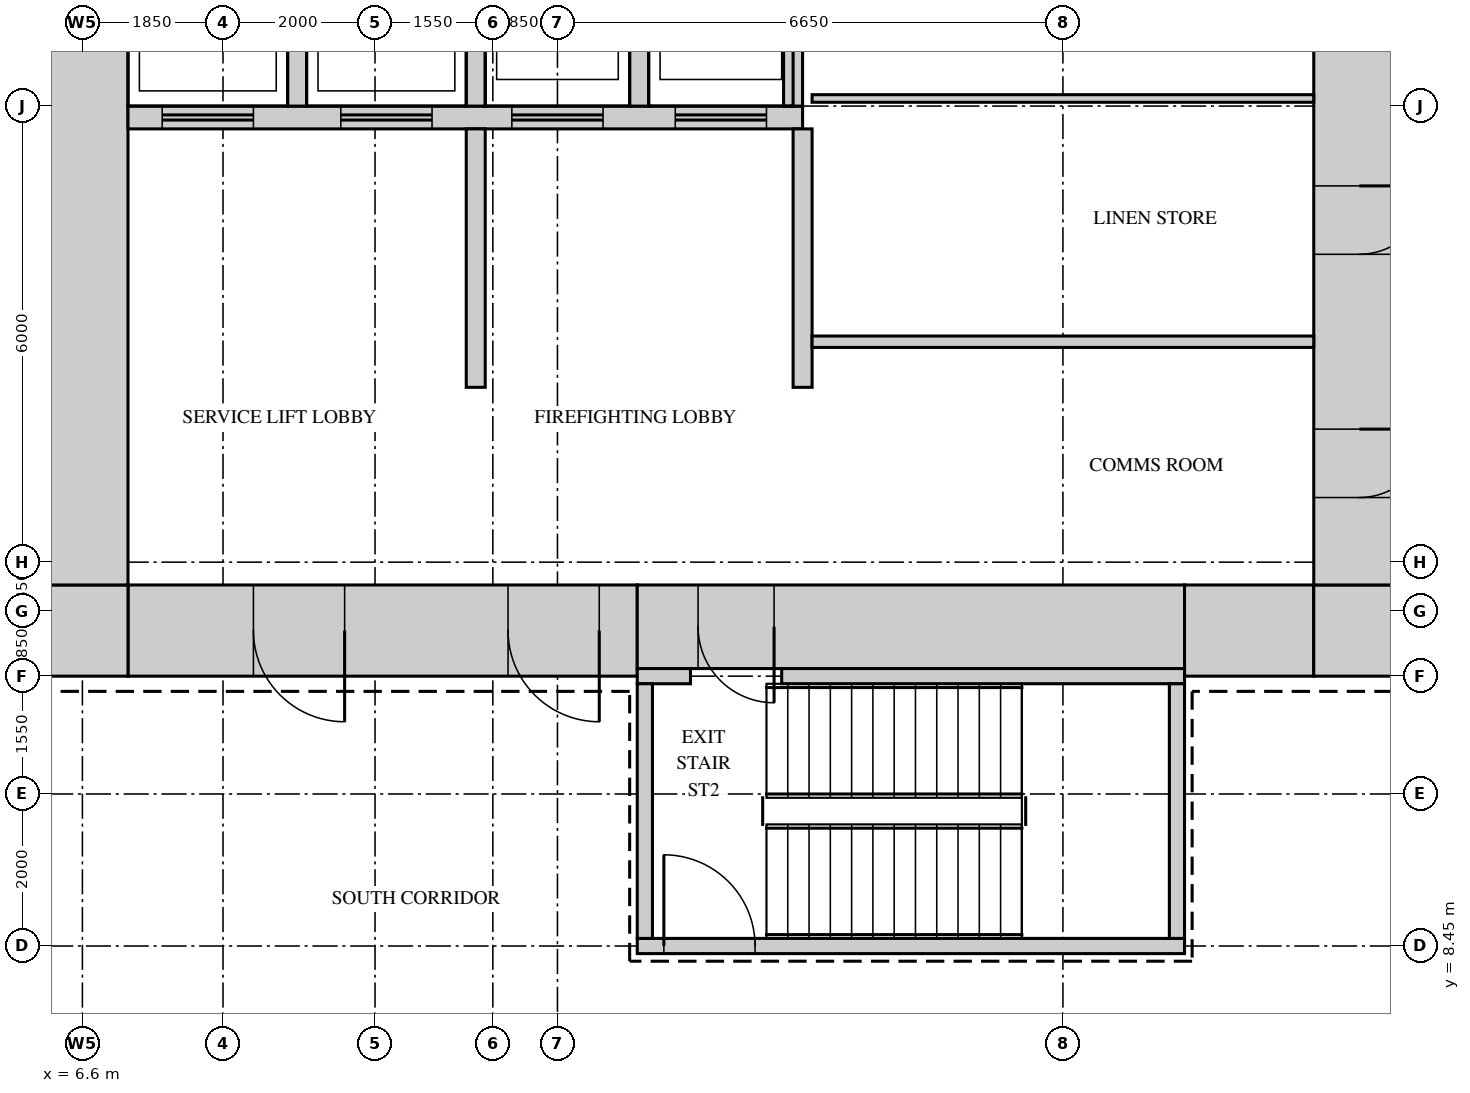
"""IFC4 building model, lengths in metres.
Left out: names, types, materials, properties, quantities, classifications, styles, units other than length and angle.
Written with IfcOpenShell. Run it as: python <this file> out.ifc"""

import sys

from ifc_helpers import new_model, si_unit, direction, frame, frame_2d, origin, place, context, subcontext, project, spatial, rectangle, extrude, source, transform, mapped, element, fill, save


model = new_model("IFC4")
c1 = context("Model", 3, precision=1e-05, world=origin(), true_north=direction((0.0, 1.0)))
c2 = subcontext(c1, "Body", "Model", "MODEL_VIEW")
j1 = project(units=[si_unit("LENGTHUNIT", "METRE"), si_unit("PLANEANGLEUNIT", "RADIAN")], contexts=[c1])
p1 = place(None, origin())
s1 = spatial("IfcSite", under=j1, at=p1, CompositionType="ELEMENT")
p2 = place(p1, origin())
s2 = spatial("IfcBuilding", under=s1, at=p2, CompositionType="ELEMENT")
p3 = place(p2, frame((0.0, 0.0, 55.5)))
s3 = spatial("IfcBuildingStorey", under=s2, at=p3, CompositionType="ELEMENT", Elevation=55.5)
m1 = source(origin(), c2, "Body", "SweptSolid", [
    extrude(rectangle(XDim=6.7, YDim=1.2, at=frame_2d((3.35, 0.0))), origin(), (0.0, 0.0, 1.0), 4.2),
])
p4 = place(p3, frame((7.2, 12.6, 0.0), z_axis=(0.0, 0.0, 1.0), x_axis=(1.0, 0.0, 0.0)))
e1 = element("IfcWall", 1, at=p4, inside=s3, PredefinedType="SHEAR", context=c2, shape_type="MappedRepresentation", body=[
    mapped(m1, transform((0.0, 0.0, 0.0))),
])
m2 = source(origin(), c2, "Body", "SweptSolid", [
    extrude(rectangle(XDim=1.2, YDim=2.1, at=frame_2d((0.6, 1.05))), frame((0.0, 0.61, 0.0), z_axis=(0.0, -1.0, 0.0), x_axis=(1.0, 0.0, 0.0)), (0.0, 0.0, 1.0), 1.22),
])
p5 = place(p4, frame((5.0, 0.0, 0.0)))
e2 = element("IfcOpeningElement", 2, at=p5, cuts=e1, PredefinedType="OPENING", context=c2, shape_type="MappedRepresentation", body=[
    mapped(m2, transform((0.0, 0.0, 0.0))),
])
p6 = place(p4, frame((1.65, 0.0, 0.0)))
e3 = element("IfcOpeningElement", 3, at=p6, cuts=e1, PredefinedType="OPENING", context=c2, shape_type="MappedRepresentation", body=[
    mapped(m2, transform((0.0, 0.0, 0.0))),
])
m3 = source(origin(), c2, "Body", "SweptSolid", [
    extrude(rectangle(XDim=7.2, YDim=1.1, at=frame_2d((3.6, 0.0))), origin(), (0.0, 0.0, 1.0), 4.2),
])
p7 = place(p3, frame((13.9, 12.65, 0.0), z_axis=(0.0, 0.0, 1.0), x_axis=(1.0, 0.0, 0.0)))
e4 = element("IfcWall", 4, at=p7, inside=s3, PredefinedType="SHEAR", context=c2, shape_type="MappedRepresentation", body=[
    mapped(m3, transform((0.0, 0.0, 0.0))),
])
m4 = source(origin(), c2, "Body", "SweptSolid", [
    extrude(rectangle(XDim=1.0, YDim=2.1, at=frame_2d((0.5, 1.05))), frame((0.0, 0.56, 0.0), z_axis=(0.0, -1.0, 0.0), x_axis=(1.0, 0.0, 0.0)), (0.0, 0.0, 1.0), 1.12),
])
p8 = place(p7, frame((0.8, 0.0, 0.0)))
e5 = element("IfcOpeningElement", 5, at=p8, cuts=e4, PredefinedType="OPENING", context=c2, shape_type="MappedRepresentation", body=[
    mapped(m4, transform((0.0, 0.0, 0.0))),
])
m5 = source(origin(), c2, "Body", "SweptSolid", [
    extrude(rectangle(XDim=1.7, YDim=1.2, at=frame_2d((0.85, 0.0))), origin(), (0.0, 0.0, 1.0), 4.2),
])
p9 = place(p3, frame((21.1, 12.6, 0.0), z_axis=(0.0, 0.0, 1.0), x_axis=(1.0, 0.0, 0.0)))
e6 = element("IfcWall", 6, at=p9, inside=s3, PredefinedType="SHEAR", context=c2, shape_type="MappedRepresentation", body=[
    mapped(m5, transform((0.0, 0.0, 0.0))),
])
m6 = source(origin(), c2, "Body", "SweptSolid", [
    extrude(rectangle(XDim=1.2, YDim=1.2, at=frame_2d((0.6, 0.0))), origin(), (0.0, 0.0, 1.0), 4.2),
])
for number, where, z_axis, x_axis in (
    (7, (22.8, 12.6, 0.0), (0.0, 0.0, 1.0), (1.0, 0.0, 0.0)),
    (8, (6.0, 12.6, 0.0), (0.0, 0.0, 1.0), (1.0, 0.0, 0.0)),
):
    element("IfcWall", number, at=place(p3, frame(where, z_axis=z_axis, x_axis=x_axis)), inside=s3, PredefinedType="SHEAR", context=c2, shape_type="MappedRepresentation", body=[
        mapped(m6, transform((0.0, 0.0, 0.0))),
    ])
m7 = source(origin(), c2, "Body", "SweptSolid", [
    extrude(rectangle(XDim=27.6, YDim=1.2, at=frame_2d((13.8, 0.0))), origin(), (0.0, 0.0, 1.0), 4.2),
])
p10 = place(p3, frame((23.4, 13.2, 0.0), z_axis=(0.0, 0.0, 1.0), x_axis=(0.0, 1.0, 0.0)))
e9 = element("IfcWall", 9, at=p10, inside=s3, PredefinedType="SHEAR", context=c2, shape_type="MappedRepresentation", body=[
    mapped(m7, transform((0.0, 0.0, 0.0))),
])
m8 = source(origin(), c2, "Body", "SweptSolid", [
    extrude(rectangle(XDim=1.8, YDim=2.1, at=frame_2d((0.9, 1.05))), frame((0.0, 0.61, 0.0), z_axis=(0.0, -1.0, 0.0), x_axis=(1.0, 0.0, 0.0)), (0.0, 0.0, 1.0), 1.22),
])
p11 = place(p10, frame((22.4, 0.0, 0.0)))
e10 = element("IfcOpeningElement", 10, at=p11, cuts=e9, PredefinedType="OPENING", context=c2, shape_type="MappedRepresentation", body=[
    mapped(m8, transform((0.0, 0.0, 0.0))),
])
p12 = place(p10, frame((15.15, 0.0, 0.0)))
e11 = element("IfcOpeningElement", 11, at=p12, cuts=e9, PredefinedType="OPENING", context=c2, shape_type="MappedRepresentation", body=[
    mapped(m2, transform((0.0, 0.0, 0.0))),
])
m9 = source(origin(), c2, "Body", "SweptSolid", [
    extrude(rectangle(XDim=0.9, YDim=2.1, at=frame_2d((0.45, 1.05))), frame((0.0, 0.61, 0.0), z_axis=(0.0, -1.0, 0.0), x_axis=(1.0, 0.0, 0.0)), (0.0, 0.0, 1.0), 1.22),
])
p13 = place(p10, frame((1.15, 0.0, 0.0)))
e12 = element("IfcOpeningElement", 12, at=p13, cuts=e9, PredefinedType="OPENING", context=c2, shape_type="MappedRepresentation", body=[
    mapped(m9, transform((0.0, 0.0, 0.0))),
])
p14 = place(p10, frame((4.35, 0.0, 0.0)))
e13 = element("IfcOpeningElement", 13, at=p14, cuts=e9, PredefinedType="OPENING", context=c2, shape_type="MappedRepresentation", body=[
    mapped(m9, transform((0.0, 0.0, 0.0))),
])
p15 = place(p10, frame((7.6, 0.0, 0.0)))
e14 = element("IfcOpeningElement", 14, at=p15, cuts=e9, PredefinedType="OPENING", context=c2, shape_type="MappedRepresentation", body=[
    mapped(m9, transform((0.0, 0.0, 0.0))),
])
p16 = place(p3, frame((6.6, 13.2, 0.0), z_axis=(0.0, 0.0, 1.0), x_axis=(0.0, 1.0, 0.0)))
e15 = element("IfcWall", 15, at=p16, inside=s3, PredefinedType="SHEAR", context=c2, shape_type="MappedRepresentation", body=[
    mapped(m7, transform((0.0, 0.0, 0.0))),
])
m10 = source(origin(), c2, "Body", "SweptSolid", [
    extrude(rectangle(XDim=0.7, YDim=0.2, at=frame_2d((0.35, 0.0))), origin(), (0.0, 0.0, 1.0), 4.2),
])
p17 = place(p3, frame((13.9, 12.0, 0.0), z_axis=(0.0, 0.0, 1.0), x_axis=(1.0, 0.0, 0.0)))
e16 = element("IfcWall", 16, at=p17, inside=s3, PredefinedType="SHEAR", context=c2, shape_type="MappedRepresentation", body=[
    mapped(m10, transform((0.0, 0.0, 0.0))),
])
m11 = source(origin(), c2, "Body", "SweptSolid", [
    extrude(rectangle(XDim=5.3, YDim=0.2, at=frame_2d((2.65, 0.0))), origin(), (0.0, 0.0, 1.0), 4.2),
])
p18 = place(p3, frame((15.8, 12.0, 0.0), z_axis=(0.0, 0.0, 1.0), x_axis=(1.0, 0.0, 0.0)))
e17 = element("IfcWall", 17, at=p18, inside=s3, PredefinedType="SHEAR", context=c2, shape_type="MappedRepresentation", body=[
    mapped(m11, transform((0.0, 0.0, 0.0))),
])
m12 = source(origin(), c2, "Body", "SweptSolid", [
    extrude(rectangle(XDim=7.2, YDim=0.2, at=frame_2d((3.6, 0.0))), origin(), (0.0, 0.0, 1.0), 4.2),
])
p19 = place(p3, frame((13.9, 8.45, 0.0), z_axis=(0.0, 0.0, 1.0), x_axis=(1.0, 0.0, 0.0)))
e18 = element("IfcWall", 18, at=p19, inside=s3, PredefinedType="SHEAR", context=c2, shape_type="MappedRepresentation", body=[
    mapped(m12, transform((0.0, 0.0, 0.0))),
])
m13 = source(origin(), c2, "Body", "SweptSolid", [
    extrude(rectangle(XDim=1.2, YDim=2.1, at=frame_2d((0.6, 1.05))), frame((0.0, 0.11, 0.0), z_axis=(0.0, -1.0, 0.0), x_axis=(1.0, 0.0, 0.0)), (0.0, 0.0, 1.0), 0.22),
])
p20 = place(p19, frame((0.35, 0.0, 0.0)))
e19 = element("IfcOpeningElement", 19, at=p20, cuts=e18, PredefinedType="OPENING", context=c2, shape_type="MappedRepresentation", body=[
    mapped(m13, transform((0.0, 0.0, 0.0))),
])
m14 = source(origin(), c2, "Body", "SweptSolid", [
    extrude(rectangle(XDim=3.35, YDim=0.2, at=frame_2d((1.675, 0.0))), origin(), (0.0, 0.0, 1.0), 4.2),
])
for number, where, z_axis, x_axis in (
    (20, (21.0, 8.55, 0.0), (0.0, 0.0, 1.0), (0.0, 1.0, 0.0)),
    (21, (14.0, 8.55, 0.0), (0.0, 0.0, 1.0), (0.0, 1.0, 0.0)),
):
    element("IfcWall", number, at=place(p3, frame(where, z_axis=z_axis, x_axis=x_axis)), inside=s3, PredefinedType="SHEAR", context=c2, shape_type="MappedRepresentation", body=[
        mapped(m14, transform((0.0, 0.0, 0.0))),
    ])
m15 = source(origin(), c2, "Body", "SweptSolid", [
    extrude(rectangle(XDim=8.875, YDim=0.3, at=frame_2d((4.438, 0.0))), origin(), (0.0, 0.0, 1.0), 4.2),
])
p21 = place(p3, frame((7.2, 19.35, 0.0), z_axis=(0.0, 0.0, 1.0), x_axis=(1.0, 0.0, 0.0)))
e22 = element("IfcWall", 22, at=p21, inside=s3, PredefinedType="STANDARD", context=c2, shape_type="MappedRepresentation", body=[
    mapped(m15, transform((0.0, 0.0, 0.0))),
])
m16 = source(origin(), c2, "Body", "SweptSolid", [
    extrude(rectangle(XDim=1.2, YDim=2.1, at=frame_2d((0.6, 1.05))), frame((0.0, 0.16, 0.0), z_axis=(0.0, -1.0, 0.0), x_axis=(1.0, 0.0, 0.0)), (0.0, 0.0, 1.0), 0.32),
])
p22 = place(p21, frame((0.45, 0.0, 0.0)))
e23 = element("IfcOpeningElement", 23, at=p22, cuts=e22, PredefinedType="OPENING", context=c2, shape_type="MappedRepresentation", body=[
    mapped(m16, transform((0.0, 0.0, 0.0))),
])
p23 = place(p21, frame((2.8, 0.0, 0.0)))
e24 = element("IfcOpeningElement", 24, at=p23, cuts=e22, PredefinedType="OPENING", context=c2, shape_type="MappedRepresentation", body=[
    mapped(m16, transform((0.0, 0.0, 0.0))),
])
p24 = place(p21, frame((5.05, 0.0, 0.0)))
e25 = element("IfcOpeningElement", 25, at=p24, cuts=e22, PredefinedType="OPENING", context=c2, shape_type="MappedRepresentation", body=[
    mapped(m16, transform((0.0, 0.0, 0.0))),
])
p25 = place(p21, frame((7.2, 0.0, 0.0)))
e26 = element("IfcOpeningElement", 26, at=p25, cuts=e22, PredefinedType="OPENING", context=c2, shape_type="MappedRepresentation", body=[
    mapped(m16, transform((0.0, 0.0, 0.0))),
])
m17 = source(origin(), c2, "Body", "SweptSolid", [
    extrude(rectangle(XDim=3.1, YDim=0.25, at=frame_2d((1.55, 0.0))), origin(), (0.0, 0.0, 1.0), 4.2),
])
for number, where, z_axis, x_axis in (
    (27, (9.425, 19.5, 0.0), (0.0, 0.0, 1.0), (0.0, 1.0, 0.0)),
    (28, (11.775, 19.5, 0.0), (0.0, 0.0, 1.0), (0.0, 1.0, 0.0)),
    (29, (13.925, 19.5, 0.0), (0.0, 0.0, 1.0), (0.0, 1.0, 0.0)),
    (30, (15.95, 19.5, 0.0), (0.0, 0.0, 1.0), (0.0, 1.0, 0.0)),
):
    element("IfcWall", number, at=place(p3, frame(where, z_axis=z_axis, x_axis=x_axis)), inside=s3, PredefinedType="STANDARD", context=c2, shape_type="MappedRepresentation", body=[
        mapped(m17, transform((0.0, 0.0, 0.0))),
    ])
m18 = source(origin(), c2, "Body", "SweptSolid", [
    extrude(rectangle(XDim=3.4, YDim=0.25, at=frame_2d((1.7, 0.0))), origin(), (0.0, 0.0, 1.0), 4.2),
])
for number, where, z_axis, x_axis in (
    (31, (16.075, 15.8, 0.0), (0.0, 0.0, 1.0), (0.0, 1.0, 0.0)),
    (32, (11.775, 15.8, 0.0), (0.0, 0.0, 1.0), (0.0, 1.0, 0.0)),
):
    element("IfcWall", number, at=place(p3, frame(where, z_axis=z_axis, x_axis=x_axis)), inside=s3, PredefinedType="STANDARD", context=c2, shape_type="MappedRepresentation", body=[
        mapped(m18, transform((0.0, 0.0, 0.0))),
    ])
m19 = source(origin(), c2, "Body", "SweptSolid", [
    extrude(rectangle(XDim=6.6, YDim=0.15, at=frame_2d((3.3, 0.0))), origin(), (0.0, 0.0, 1.0), 4.3),
])
p26 = place(p3, frame((16.2, 16.4, 0.0), z_axis=(0.0, 0.0, 1.0), x_axis=(1.0, 0.0, 0.0)))
e33 = element("IfcWall", 33, at=p26, inside=s3, PredefinedType="PARTITIONING", context=c2, shape_type="MappedRepresentation", body=[
    mapped(m19, transform((0.0, 0.0, 0.0))),
])
m20 = source(origin(), c2, "Body", "SweptSolid", [
    extrude(rectangle(XDim=6.6, YDim=0.1, at=frame_2d((3.3, 0.0))), origin(), (0.0, 0.0, 1.0), 4.3),
])
p27 = place(p3, frame((16.2, 19.6, 0.0), z_axis=(0.0, 0.0, 1.0), x_axis=(1.0, 0.0, 0.0)))
e34 = element("IfcWall", 34, at=p27, inside=s3, PredefinedType="PARTITIONING", context=c2, shape_type="MappedRepresentation", body=[
    mapped(m20, transform((0.0, 0.0, 0.0))),
])
m21 = source(origin(), c2, "Body", "SweptSolid", [
    extrude(rectangle(XDim=0.9, YDim=2.1, at=frame_2d((0.45, 1.05))), frame((0.0, 0.55, 0.0), z_axis=(0.0, -1.0, 0.0), x_axis=(1.0, 0.0, 0.0)), (0.0, 0.0, 1.0), 1.1),
])
p28 = place(p13, origin())
e35 = element("IfcDoor", 35, at=p28, inside=s3, OperationType="SINGLE_SWING_RIGHT", PredefinedType="DOOR", context=c2, shape_type="MappedRepresentation", body=[
    mapped(m21, transform((0.0, 0.0, 0.0))),
])
fill(e12, e35)
p29 = place(p14, origin())
e36 = element("IfcDoor", 36, at=p29, inside=s3, OperationType="SINGLE_SWING_RIGHT", PredefinedType="DOOR", context=c2, shape_type="MappedRepresentation", body=[
    mapped(m21, transform((0.0, 0.0, 0.0))),
])
fill(e13, e36)
m22 = source(origin(), c2, "Body", "SweptSolid", [
    extrude(rectangle(XDim=1.2, YDim=2.1, at=frame_2d((0.6, 1.05))), frame((0.0, 0.55, 0.0), z_axis=(0.0, -1.0, 0.0), x_axis=(1.0, 0.0, 0.0)), (0.0, 0.0, 1.0), 1.1),
])
p30 = place(p5, origin())
e37 = element("IfcDoor", 37, at=p30, inside=s3, OperationType="SINGLE_SWING_RIGHT", PredefinedType="DOOR", context=c2, shape_type="MappedRepresentation", body=[
    mapped(m22, transform((0.0, 0.0, 0.0))),
])
fill(e2, e37)
p31 = place(p6, origin())
e38 = element("IfcDoor", 38, at=p31, inside=s3, OperationType="SINGLE_SWING_RIGHT", PredefinedType="DOOR", context=c2, shape_type="MappedRepresentation", body=[
    mapped(m22, transform((0.0, 0.0, 0.0))),
])
fill(e3, e38)
m23 = source(origin(), c2, "Body", "SweptSolid", [
    extrude(rectangle(XDim=1.0, YDim=2.1, at=frame_2d((0.5, 1.05))), frame((0.0, 0.5, 0.0), z_axis=(0.0, -1.0, 0.0), x_axis=(1.0, 0.0, 0.0)), (0.0, 0.0, 1.0), 1.0),
])
p32 = place(p8, origin())
e39 = element("IfcDoor", 39, at=p32, inside=s3, OperationType="SINGLE_SWING_RIGHT", PredefinedType="DOOR", context=c2, shape_type="MappedRepresentation", body=[
    mapped(m23, transform((0.0, 0.0, 0.0))),
])
fill(e5, e39)
m24 = source(origin(), c2, "Body", "SweptSolid", [
    extrude(rectangle(XDim=1.2, YDim=2.1, at=frame_2d((0.6, 1.05))), frame((0.0, 0.025, 0.0), z_axis=(0.0, -1.0, 0.0), x_axis=(1.0, 0.0, 0.0)), (0.0, 0.0, 1.0), 0.05),
])
p33 = place(p20, origin())
e40 = element("IfcDoor", 40, at=p33, inside=s3, OperationType="SINGLE_SWING_RIGHT", PredefinedType="DOOR", context=c2, shape_type="MappedRepresentation", body=[
    mapped(m24, transform((0.0, 0.0, 0.0))),
])
fill(e19, e40)
p34 = place(p22, origin())
e41 = element("IfcDoor", 41, at=p34, inside=s3, OperationType="DOUBLE_DOOR_SLIDING", PredefinedType="DOOR", context=c2, shape_type="MappedRepresentation", body=[
    mapped(m24, transform((0.0, 0.0, 0.0))),
])
fill(e23, e41)
p35 = place(p23, origin())
e42 = element("IfcDoor", 42, at=p35, inside=s3, OperationType="DOUBLE_DOOR_SLIDING", PredefinedType="DOOR", context=c2, shape_type="MappedRepresentation", body=[
    mapped(m24, transform((0.0, 0.0, 0.0))),
])
fill(e24, e42)
p36 = place(p24, origin())
e43 = element("IfcDoor", 43, at=p36, inside=s3, OperationType="DOUBLE_DOOR_SLIDING", PredefinedType="DOOR", context=c2, shape_type="MappedRepresentation", body=[
    mapped(m24, transform((0.0, 0.0, 0.0))),
])
fill(e25, e43)
p37 = place(p25, origin())
e44 = element("IfcDoor", 44, at=p37, inside=s3, OperationType="DOUBLE_DOOR_SLIDING", PredefinedType="DOOR", context=c2, shape_type="MappedRepresentation", body=[
    mapped(m24, transform((0.0, 0.0, 0.0))),
])
fill(e26, e44)
save(model, sys.argv[1])
